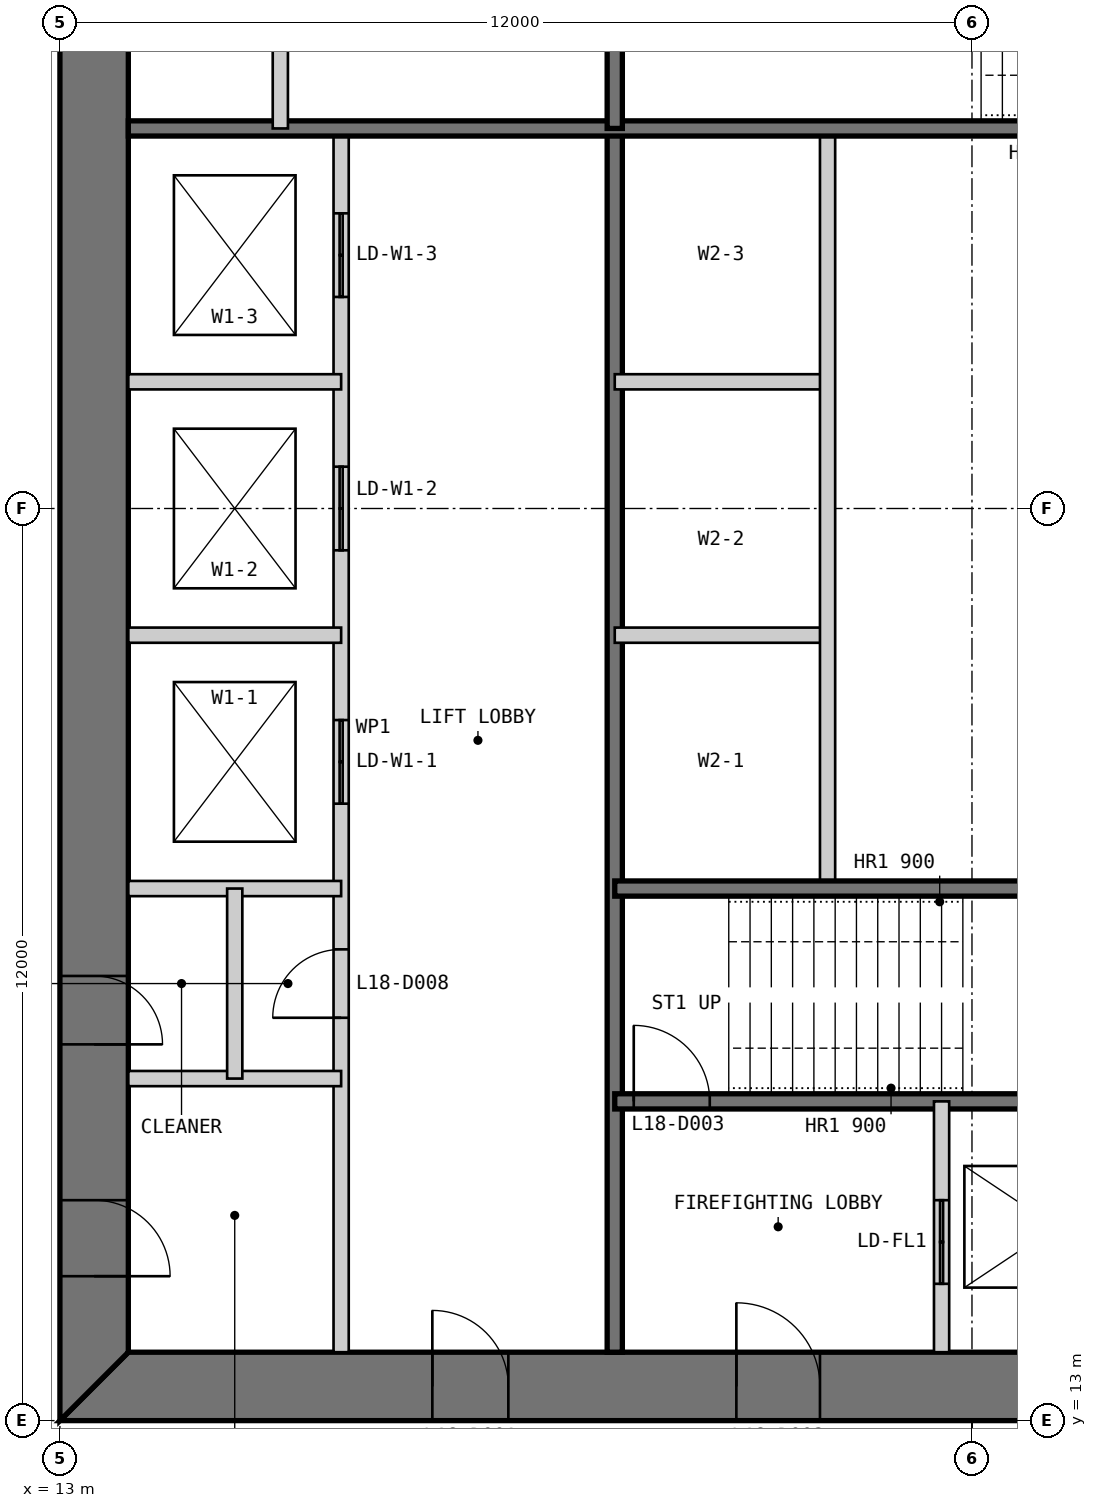
"""IFC4 building model, lengths in metres.
Left out: names, types, materials, properties, quantities, classifications, styles, units other than length and angle.
Written with IfcOpenShell. Run it as: python <this file> out.ifc"""

import sys

from ifc_helpers import new_model, si_unit, direction, frame, frame_2d, origin, place, context, subcontext, project, spatial, polyline, rectangle, outline, extrude, element, fill, save


model = new_model("IFC4")
c1 = context("Model", 3, precision=1e-05, world=origin(), true_north=direction((0.0, 1.0)))
c2 = subcontext(c1, "Body", "Model", "MODEL_VIEW")
j1 = project(units=[si_unit("LENGTHUNIT", "METRE"), si_unit("PLANEANGLEUNIT", "RADIAN")], contexts=[c1])
p1 = place(None, origin())
s1 = spatial("IfcSite", under=j1, at=p1, CompositionType="ELEMENT")
p2 = place(p1, origin())
s2 = spatial("IfcBuilding", under=s1, at=p2, CompositionType="ELEMENT")
p3 = place(p2, frame((0.0, 0.0, 79.0)))
s3 = spatial("IfcBuildingStorey", under=s2, at=p3, CompositionType="ELEMENT", Elevation=79.0)
p4 = place(p3, frame((13.0, 13.45, 0.0), z_axis=(0.0, 0.0, 1.0), x_axis=(1.0, 0.0, 0.0)))
e1 = element("IfcWall", 1, at=p4, inside=s3, PredefinedType="SHEAR", context=c2, shape_type="SweptSolid", body=[
    extrude(outline(polyline([(0.0, -0.45), (24.0, -0.45), (23.1, 0.45), (0.9, 0.45), (0.0, -0.45)])), origin(), (0.0, 0.0, 1.0), 4.0),
])
p5 = place(p4, frame((4.9, 0.0, 0.0)))
e2 = element("IfcOpeningElement", 2, at=p5, cuts=e1, PredefinedType="OPENING", context=c2, shape_type="SweptSolid", body=[
    extrude(rectangle(XDim=1.0, YDim=2.2, at=frame_2d((0.5, 1.1))), frame((0.0, 0.46, 0.0), z_axis=(0.0, -1.0, 0.0), x_axis=(1.0, 0.0, 0.0)), (0.0, 0.0, 1.0), 0.92),
])
p6 = place(p4, frame((8.9, 0.0, 0.0)))
e3 = element("IfcOpeningElement", 3, at=p6, cuts=e1, PredefinedType="OPENING", context=c2, shape_type="SweptSolid", body=[
    extrude(rectangle(XDim=1.1, YDim=2.2, at=frame_2d((0.55, 1.1))), frame((0.0, 0.46, 0.0), z_axis=(0.0, -1.0, 0.0), x_axis=(1.0, 0.0, 0.0)), (0.0, 0.0, 1.0), 0.92),
])
p7 = place(p4, frame((15.05, 0.0, 0.0)))
e4 = element("IfcOpeningElement", 4, at=p7, cuts=e1, PredefinedType="OPENING", context=c2, shape_type="SweptSolid", body=[
    extrude(rectangle(XDim=0.9, YDim=2.2, at=frame_2d((0.45, 1.1))), frame((0.0, 0.46, 0.0), z_axis=(0.0, -1.0, 0.0), x_axis=(1.0, 0.0, 0.0)), (0.0, 0.0, 1.0), 0.92),
])
p8 = place(p4, frame((17.9, 0.0, 0.0)))
e5 = element("IfcOpeningElement", 5, at=p8, cuts=e1, PredefinedType="OPENING", context=c2, shape_type="SweptSolid", body=[
    extrude(rectangle(XDim=1.0, YDim=2.2, at=frame_2d((0.5, 1.1))), frame((0.0, 0.46, 0.0), z_axis=(0.0, -1.0, 0.0), x_axis=(1.0, 0.0, 0.0)), (0.0, 0.0, 1.0), 0.92),
])
p9 = place(p4, frame((21.4, 0.0, 0.0)))
e6 = element("IfcOpeningElement", 6, at=p9, cuts=e1, PredefinedType="OPENING", context=c2, shape_type="SweptSolid", body=[
    extrude(rectangle(XDim=1.0, YDim=2.2, at=frame_2d((0.5, 1.1))), frame((0.0, 0.46, 0.0), z_axis=(0.0, -1.0, 0.0), x_axis=(1.0, 0.0, 0.0)), (0.0, 0.0, 1.0), 0.92),
])
p10 = place(p3, frame((13.45, 36.1, 0.0), z_axis=(0.0, 0.0, 1.0), x_axis=(0.0, -1.0, 0.0)))
e7 = element("IfcWall", 7, at=p10, inside=s3, PredefinedType="SHEAR", context=c2, shape_type="SweptSolid", body=[
    extrude(outline(polyline([(-0.9, -0.45), (23.1, -0.45), (22.2, 0.45), (0.0, 0.45), (-0.9, -0.45)])), origin(), (0.0, 0.0, 1.0), 4.0),
])
p11 = place(p10, frame((20.2, 0.0, 0.0)))
e8 = element("IfcOpeningElement", 8, at=p11, cuts=e7, PredefinedType="OPENING", context=c2, shape_type="SweptSolid", body=[
    extrude(rectangle(XDim=1.0, YDim=2.2, at=frame_2d((0.5, 1.1))), frame((0.0, 0.46, 0.0), z_axis=(0.0, -1.0, 0.0), x_axis=(1.0, 0.0, 0.0)), (0.0, 0.0, 1.0), 0.92),
])
p12 = place(p10, frame((17.25, 0.0, 0.0)))
e9 = element("IfcOpeningElement", 9, at=p12, cuts=e7, PredefinedType="OPENING", context=c2, shape_type="SweptSolid", body=[
    extrude(rectangle(XDim=0.9, YDim=2.2, at=frame_2d((0.45, 1.1))), frame((0.0, 0.46, 0.0), z_axis=(0.0, -1.0, 0.0), x_axis=(1.0, 0.0, 0.0)), (0.0, 0.0, 1.0), 0.92),
])
p13 = place(p3, frame((16.7, 13.9, 0.0), z_axis=(0.0, 0.0, 1.0), x_axis=(0.0, 1.0, 0.0)))
e10 = element("IfcWall", 10, at=p13, inside=s3, PredefinedType="PARTITIONING", context=c2, shape_type="SweptSolid", body=[
    extrude(rectangle(XDim=16.1, YDim=0.2, at=frame_2d((8.05, 0.0))), origin(), (0.0, 0.0, 1.0), 3.8),
])
p14 = place(p13, frame((4.4, 0.0, 0.0)))
e11 = element("IfcOpeningElement", 11, at=p14, cuts=e10, PredefinedType="OPENING", context=c2, shape_type="SweptSolid", body=[
    extrude(rectangle(XDim=0.9, YDim=2.2, at=frame_2d((0.45, 1.1))), frame((0.0, 0.11, 0.0), z_axis=(0.0, -1.0, 0.0), x_axis=(1.0, 0.0, 0.0)), (0.0, 0.0, 1.0), 0.22),
])
p15 = place(p13, frame((7.217, 0.0, 0.0)))
e12 = element("IfcOpeningElement", 12, at=p15, cuts=e10, PredefinedType="OPENING", context=c2, shape_type="SweptSolid", body=[
    extrude(rectangle(XDim=1.1, YDim=2.2, at=frame_2d((0.55, 1.1))), frame((0.0, 0.11, 0.0), z_axis=(0.0, -1.0, 0.0), x_axis=(1.0, 0.0, 0.0)), (0.0, 0.0, 1.0), 0.22),
])
p16 = place(p13, frame((10.55, 0.0, 0.0)))
e13 = element("IfcOpeningElement", 13, at=p16, cuts=e10, PredefinedType="OPENING", context=c2, shape_type="SweptSolid", body=[
    extrude(rectangle(XDim=1.1, YDim=2.2, at=frame_2d((0.55, 1.1))), frame((0.0, 0.11, 0.0), z_axis=(0.0, -1.0, 0.0), x_axis=(1.0, 0.0, 0.0)), (0.0, 0.0, 1.0), 0.22),
])
p17 = place(p13, frame((13.883, 0.0, 0.0)))
e14 = element("IfcOpeningElement", 14, at=p17, cuts=e10, PredefinedType="OPENING", context=c2, shape_type="SweptSolid", body=[
    extrude(rectangle(XDim=1.1, YDim=2.2, at=frame_2d((0.55, 1.1))), frame((0.0, 0.11, 0.0), z_axis=(0.0, -1.0, 0.0), x_axis=(1.0, 0.0, 0.0)), (0.0, 0.0, 1.0), 0.22),
])
p18 = place(p3, frame((20.3, 13.9, 0.0), z_axis=(0.0, 0.0, 1.0), x_axis=(0.0, 1.0, 0.0)))
e15 = element("IfcWall", 15, at=p18, inside=s3, PredefinedType="SOLIDWALL", context=c2, shape_type="SweptSolid", body=[
    extrude(rectangle(XDim=16.1, YDim=0.2, at=frame_2d((8.05, 0.0))), origin(), (0.0, 0.0, 1.0), 3.8),
])
for number, where, z_axis, x_axis in (
    (16, (13.9, 20.0, 0.0), (0.0, 0.0, 1.0), (1.0, 0.0, 0.0)),
    (17, (13.9, 23.333, 0.0), (0.0, 0.0, 1.0), (1.0, 0.0, 0.0)),
    (18, (13.9, 26.667, 0.0), (0.0, 0.0, 1.0), (1.0, 0.0, 0.0)),
    (19, (20.3, 23.333, 0.0), (0.0, 0.0, 1.0), (1.0, 0.0, 0.0)),
    (20, (20.3, 26.667, 0.0), (0.0, 0.0, 1.0), (1.0, 0.0, 0.0)),
):
    element("IfcWall", number, at=place(p3, frame(where, z_axis=z_axis, x_axis=x_axis)), inside=s3, PredefinedType="PARTITIONING", context=c2, shape_type="SweptSolid", body=[
        extrude(rectangle(XDim=2.8, YDim=0.2, at=frame_2d((1.4, 0.0))), origin(), (0.0, 0.0, 1.0), 3.8),
    ])
p19 = place(p3, frame((23.1, 20.0, 0.0), z_axis=(0.0, 0.0, 1.0), x_axis=(0.0, 1.0, 0.0)))
e21 = element("IfcWall", 21, at=p19, inside=s3, PredefinedType="PARTITIONING", context=c2, shape_type="SweptSolid", body=[
    extrude(rectangle(XDim=10.0, YDim=0.2, at=frame_2d((5.0, 0.0))), origin(), (0.0, 0.0, 1.0), 3.8),
])
p20 = place(p3, frame((20.3, 17.2, 0.0), z_axis=(0.0, 0.0, 1.0), x_axis=(1.0, 0.0, 0.0)))
e22 = element("IfcWall", 22, at=p20, inside=s3, PredefinedType="SOLIDWALL", context=c2, shape_type="SweptSolid", body=[
    extrude(rectangle(XDim=9.4, YDim=0.2, at=frame_2d((4.7, 0.0))), origin(), (0.0, 0.0, 1.0), 3.8),
])
p21 = place(p20, frame((0.25, 0.0, 0.0)))
e23 = element("IfcOpeningElement", 23, at=p21, cuts=e22, PredefinedType="OPENING", context=c2, shape_type="SweptSolid", body=[
    extrude(rectangle(XDim=1.0, YDim=2.2, at=frame_2d((0.5, 1.1))), frame((0.0, 0.11, 0.0), z_axis=(0.0, -1.0, 0.0), x_axis=(1.0, 0.0, 0.0)), (0.0, 0.0, 1.0), 0.22),
])
p22 = place(p3, frame((20.3, 20.0, 0.0), z_axis=(0.0, 0.0, 1.0), x_axis=(1.0, 0.0, 0.0)))
e24 = element("IfcWall", 24, at=p22, inside=s3, PredefinedType="SOLIDWALL", context=c2, shape_type="SweptSolid", body=[
    extrude(rectangle(XDim=15.8, YDim=0.2, at=frame_2d((7.9, 0.0))), origin(), (0.0, 0.0, 1.0), 3.8),
])
p23 = place(p3, frame((24.6, 13.9, 0.0), z_axis=(0.0, 0.0, 1.0), x_axis=(0.0, 1.0, 0.0)))
e25 = element("IfcWall", 25, at=p23, inside=s3, PredefinedType="PARTITIONING", context=c2, shape_type="SweptSolid", body=[
    extrude(rectangle(XDim=3.3, YDim=0.2, at=frame_2d((1.65, 0.0))), origin(), (0.0, 0.0, 1.0), 3.8),
])
p24 = place(p23, frame((0.9, 0.0, 0.0)))
e26 = element("IfcOpeningElement", 26, at=p24, cuts=e25, PredefinedType="OPENING", context=c2, shape_type="SweptSolid", body=[
    extrude(rectangle(XDim=1.1, YDim=2.2, at=frame_2d((0.55, 1.1))), frame((0.0, 0.11, 0.0), z_axis=(0.0, -1.0, 0.0), x_axis=(1.0, 0.0, 0.0)), (0.0, 0.0, 1.0), 0.22),
])
p25 = place(p3, frame((13.9, 17.5, 0.0), z_axis=(0.0, 0.0, 1.0), x_axis=(1.0, 0.0, 0.0)))
e27 = element("IfcWall", 27, at=p25, inside=s3, PredefinedType="PARTITIONING", context=c2, shape_type="SweptSolid", body=[
    extrude(rectangle(XDim=2.8, YDim=0.2, at=frame_2d((1.4, 0.0))), origin(), (0.0, 0.0, 1.0), 3.8),
])
p26 = place(p3, frame((15.3, 17.5, 0.0), z_axis=(0.0, 0.0, 1.0), x_axis=(0.0, 1.0, 0.0)))
e28 = element("IfcWall", 28, at=p26, inside=s3, PredefinedType="PARTITIONING", context=c2, shape_type="SweptSolid", body=[
    extrude(rectangle(XDim=2.5, YDim=0.2, at=frame_2d((1.25, 0.0))), origin(), (0.0, 0.0, 1.0), 3.8),
])
p27 = place(p3, frame((29.7, 30.0, 0.0), z_axis=(0.0, 0.0, 1.0), x_axis=(-1.0, 0.0, 0.0)))
e29 = element("IfcWall", 29, at=p27, inside=s3, PredefinedType="SOLIDWALL", context=c2, shape_type="SweptSolid", body=[
    extrude(rectangle(XDim=15.8, YDim=0.2, at=frame_2d((7.9, 0.0))), origin(), (0.0, 0.0, 1.0), 3.8),
])
p28 = place(p3, frame((20.3, 36.1, 0.0), z_axis=(0.0, 0.0, 1.0), x_axis=(0.0, -1.0, 0.0)))
e30 = element("IfcWall", 30, at=p28, inside=s3, PredefinedType="SOLIDWALL", context=c2, shape_type="SweptSolid", body=[
    extrude(rectangle(XDim=6.1, YDim=0.2, at=frame_2d((3.05, 0.0))), origin(), (0.0, 0.0, 1.0), 3.8),
])
p29 = place(p3, frame((15.9, 36.1, 0.0), z_axis=(0.0, 0.0, 1.0), x_axis=(0.0, -1.0, 0.0)))
e31 = element("IfcWall", 31, at=p29, inside=s3, PredefinedType="PARTITIONING", context=c2, shape_type="SweptSolid", body=[
    extrude(rectangle(XDim=6.1, YDim=0.2, at=frame_2d((3.05, 0.0))), origin(), (0.0, 0.0, 1.0), 3.8),
])
p30 = place(p5, origin())
e32 = element("IfcDoor", 32, at=p30, inside=s3, OperationType="SINGLE_SWING_LEFT", PredefinedType="DOOR", context=c2, shape_type="SweptSolid", body=[
    extrude(rectangle(XDim=1.0, YDim=2.2, at=frame_2d((0.5, 1.1))), frame((0.0, 0.025, 0.0), z_axis=(0.0, -1.0, 0.0), x_axis=(1.0, 0.0, 0.0)), (0.0, 0.0, 1.0), 0.05),
    extrude(outline(polyline([(0.0, 0.0), (0.04, 0.0), (0.04, 2.16), (0.96, 2.16), (0.96, 0.0), (1.0, 0.0), (1.0, 2.2), (0.0, 2.2), (0.0, 0.0)])), frame((0.0, 0.3, 0.0), z_axis=(0.0, -1.0, 0.0), x_axis=(1.0, 0.0, 0.0)), (0.0, 0.0, 1.0), 0.6),
])
fill(e2, e32)
p31 = place(p6, origin())
e33 = element("IfcDoor", 33, at=p31, inside=s3, OperationType="SINGLE_SWING_LEFT", PredefinedType="DOOR", context=c2, shape_type="SweptSolid", body=[
    extrude(rectangle(XDim=1.1, YDim=2.2, at=frame_2d((0.55, 1.1))), frame((0.0, 0.025, 0.0), z_axis=(0.0, -1.0, 0.0), x_axis=(1.0, 0.0, 0.0)), (0.0, 0.0, 1.0), 0.05),
    extrude(outline(polyline([(0.0, 0.0), (0.04, 0.0), (0.04, 2.16), (1.06, 2.16), (1.06, 0.0), (1.1, 0.0), (1.1, 2.2), (0.0, 2.2), (0.0, 0.0)])), frame((0.0, 0.3, 0.0), z_axis=(0.0, -1.0, 0.0), x_axis=(1.0, 0.0, 0.0)), (0.0, 0.0, 1.0), 0.6),
])
fill(e3, e33)
p32 = place(p21, origin())
e34 = element("IfcDoor", 34, at=p32, inside=s3, OperationType="SINGLE_SWING_LEFT", PredefinedType="DOOR", context=c2, shape_type="SweptSolid", body=[
    extrude(rectangle(XDim=1.0, YDim=2.2, at=frame_2d((0.5, 1.1))), frame((0.0, 0.025, 0.0), z_axis=(0.0, -1.0, 0.0), x_axis=(1.0, 0.0, 0.0)), (0.0, 0.0, 1.0), 0.05),
])
fill(e23, e34)
p33 = place(p11, origin())
e35 = element("IfcDoor", 35, at=p33, inside=s3, OperationType="SINGLE_SWING_RIGHT", PredefinedType="DOOR", context=c2, shape_type="SweptSolid", body=[
    extrude(rectangle(XDim=1.0, YDim=2.2, at=frame_2d((0.5, 1.1))), frame((0.0, 0.025, 0.0), z_axis=(0.0, -1.0, 0.0), x_axis=(1.0, 0.0, 0.0)), (0.0, 0.0, 1.0), 0.05),
    extrude(outline(polyline([(0.0, 0.0), (0.04, 0.0), (0.04, 2.16), (0.96, 2.16), (0.96, 0.0), (1.0, 0.0), (1.0, 2.2), (0.0, 2.2), (0.0, 0.0)])), frame((0.0, 0.3, 0.0), z_axis=(0.0, -1.0, 0.0), x_axis=(1.0, 0.0, 0.0)), (0.0, 0.0, 1.0), 0.6),
])
fill(e8, e35)
p34 = place(p14, origin())
e36 = element("IfcDoor", 36, at=p34, inside=s3, OperationType="SINGLE_SWING_LEFT", PredefinedType="DOOR", context=c2, shape_type="SweptSolid", body=[
    extrude(rectangle(XDim=0.9, YDim=2.2, at=frame_2d((0.45, 1.1))), frame((0.0, 0.025, 0.0), z_axis=(0.0, -1.0, 0.0), x_axis=(1.0, 0.0, 0.0)), (0.0, 0.0, 1.0), 0.05),
])
fill(e11, e36)
p35 = place(p12, origin())
e37 = element("IfcDoor", 37, at=p35, inside=s3, OperationType="SINGLE_SWING_RIGHT", PredefinedType="DOOR", context=c2, shape_type="SweptSolid", body=[
    extrude(rectangle(XDim=0.9, YDim=2.2, at=frame_2d((0.45, 1.1))), frame((0.0, 0.025, 0.0), z_axis=(0.0, -1.0, 0.0), x_axis=(1.0, 0.0, 0.0)), (0.0, 0.0, 1.0), 0.05),
    extrude(outline(polyline([(0.0, 0.0), (0.04, 0.0), (0.04, 2.16), (0.86, 2.16), (0.86, 0.0), (0.9, 0.0), (0.9, 2.2), (0.0, 2.2), (0.0, 0.0)])), frame((0.0, 0.3, 0.0), z_axis=(0.0, -1.0, 0.0), x_axis=(1.0, 0.0, 0.0)), (0.0, 0.0, 1.0), 0.6),
])
fill(e9, e37)
p36 = place(p24, origin())
e38 = element("IfcDoor", 38, at=p36, inside=s3, OperationType="DOUBLE_DOOR_SLIDING", PredefinedType="DOOR", context=c2, shape_type="SweptSolid", body=[
    extrude(rectangle(XDim=1.1, YDim=2.2, at=frame_2d((0.55, 1.1))), frame((0.0, 0.025, 0.0), z_axis=(0.0, -1.0, 0.0), x_axis=(1.0, 0.0, 0.0)), (0.0, 0.0, 1.0), 0.05),
])
fill(e26, e38)
p37 = place(p15, origin())
e39 = element("IfcDoor", 39, at=p37, inside=s3, OperationType="DOUBLE_DOOR_SLIDING", PredefinedType="DOOR", context=c2, shape_type="SweptSolid", body=[
    extrude(rectangle(XDim=1.1, YDim=2.2, at=frame_2d((0.55, 1.1))), frame((0.0, 0.025, 0.0), z_axis=(0.0, -1.0, 0.0), x_axis=(1.0, 0.0, 0.0)), (0.0, 0.0, 1.0), 0.05),
])
fill(e12, e39)
p38 = place(p16, origin())
e40 = element("IfcDoor", 40, at=p38, inside=s3, OperationType="DOUBLE_DOOR_SLIDING", PredefinedType="DOOR", context=c2, shape_type="SweptSolid", body=[
    extrude(rectangle(XDim=1.1, YDim=2.2, at=frame_2d((0.55, 1.1))), frame((0.0, 0.025, 0.0), z_axis=(0.0, -1.0, 0.0), x_axis=(1.0, 0.0, 0.0)), (0.0, 0.0, 1.0), 0.05),
])
fill(e13, e40)
p39 = place(p17, origin())
e41 = element("IfcDoor", 41, at=p39, inside=s3, OperationType="DOUBLE_DOOR_SLIDING", PredefinedType="DOOR", context=c2, shape_type="SweptSolid", body=[
    extrude(rectangle(XDim=1.1, YDim=2.2, at=frame_2d((0.55, 1.1))), frame((0.0, 0.025, 0.0), z_axis=(0.0, -1.0, 0.0), x_axis=(1.0, 0.0, 0.0)), (0.0, 0.0, 1.0), 0.05),
])
fill(e14, e41)
save(model, sys.argv[1])
